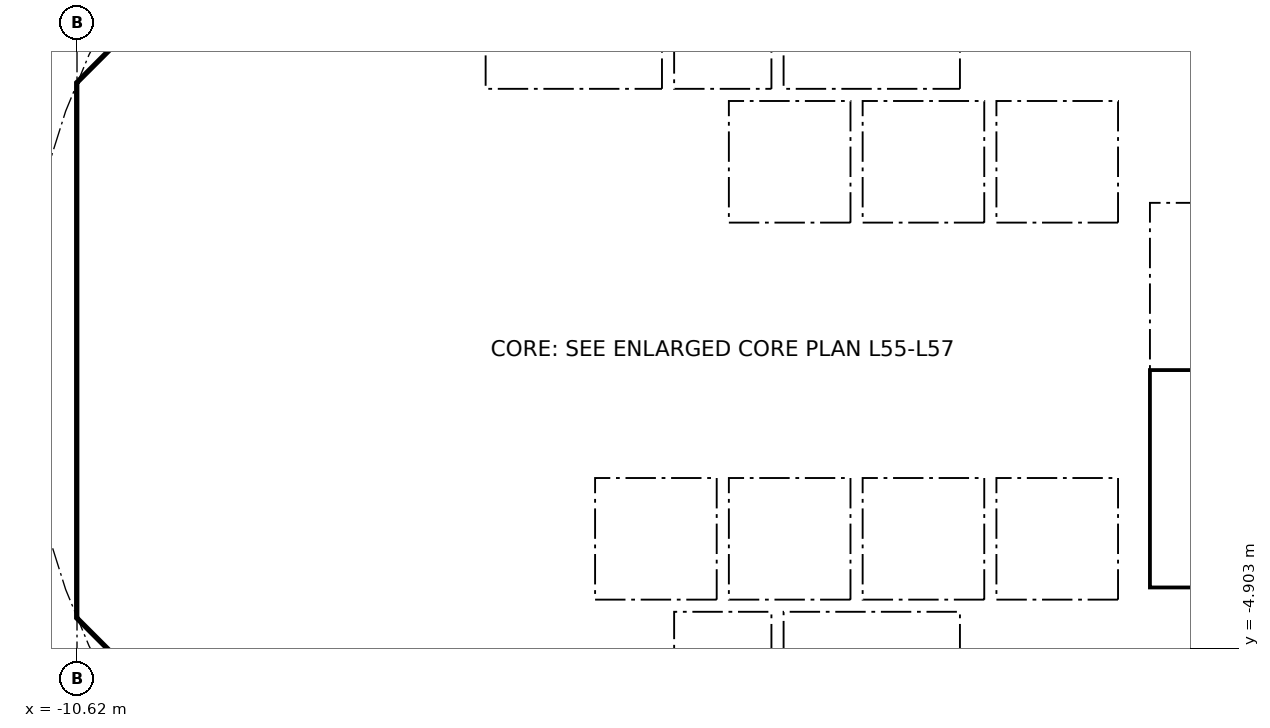
"""IFC4 building model, lengths in metres.
Left out: names, types, materials, properties, quantities, classifications, styles, units other than length and angle.
Written with IfcOpenShell. Run it as: python <this file> out.ifc"""

import sys

from ifc_helpers import new_model, si_unit, direction, frame, frame_2d, origin, place, context, subcontext, project, spatial, polyline, rectangle, outline, extrude, element, fill, save


model = new_model("IFC4")
c1 = context("Model", 3, precision=1e-05, world=origin(), true_north=direction((0.0, 1.0)))
c2 = subcontext(c1, "Body", "Model", "MODEL_VIEW")
j1 = project(units=[si_unit("LENGTHUNIT", "METRE"), si_unit("PLANEANGLEUNIT", "RADIAN")], contexts=[c1])
p1 = place(None, origin())
s1 = spatial("IfcSite", under=j1, at=p1, CompositionType="ELEMENT")
p2 = place(p1, origin())
s2 = spatial("IfcBuilding", under=s1, at=p2, CompositionType="ELEMENT")
p3 = place(p2, frame((0.0, 0.0, 227.0)))
s3 = spatial("IfcBuildingStorey", under=s2, at=p3, CompositionType="ELEMENT", Elevation=227.0)
p4 = place(p3, frame((9.988, 4.613, 0.0), z_axis=(0.0, 0.0, 1.0), x_axis=(-0.707106781187, 0.707106781187, 0.0)))
e1 = element("IfcWall", 1, at=p4, inside=s3, PredefinedType="SHEAR", context=c2, shape_type="SweptSolid", body=[
    extrude(rectangle(XDim=7.602, YDim=0.6, at=frame_2d((3.801, 0.0))), origin(), (0.0, 0.0, 1.0), 3.44),
])
p5 = place(p4, frame((3.201, 0.0, 0.0)))
e2 = element("IfcOpeningElement", 2, at=p5, cuts=e1, PredefinedType="OPENING", context=c2, shape_type="SweptSolid", body=[
    extrude(rectangle(XDim=1.2, YDim=2.1, at=frame_2d((0.6, 1.05))), frame((0.0, 0.31, 0.0), z_axis=(0.0, -1.0, 0.0), x_axis=(1.0, 0.0, 0.0)), (0.0, 0.0, 1.0), 0.62),
])
p6 = place(p3, frame((-4.613, 9.988, 0.0), z_axis=(0.0, 0.0, 1.0), x_axis=(-0.707106781187, -0.707106781187, 0.0)))
e3 = element("IfcWall", 3, at=p6, inside=s3, PredefinedType="SHEAR", context=c2, shape_type="SweptSolid", body=[
    extrude(rectangle(XDim=7.602, YDim=0.6, at=frame_2d((3.801, 0.0))), origin(), (0.0, 0.0, 1.0), 3.44),
])
p7 = place(p6, frame((0.351, 0.0, 0.0)))
e4 = element("IfcOpeningElement", 4, at=p7, cuts=e3, PredefinedType="OPENING", context=c2, shape_type="SweptSolid", body=[
    extrude(rectangle(XDim=1.1, YDim=2.1, at=frame_2d((0.55, 1.05))), frame((0.0, 0.31, 0.0), z_axis=(0.0, -1.0, 0.0), x_axis=(1.0, 0.0, 0.0)), (0.0, 0.0, 1.0), 0.62),
])
p8 = place(p3, frame((-10.325, 3.801, 0.0), z_axis=(0.0, 0.0, 1.0), x_axis=(0.0, -1.0, 0.0)))
e5 = element("IfcWall", 5, at=p8, inside=s3, PredefinedType="SHEAR", context=c2, shape_type="SweptSolid", body=[
    extrude(rectangle(XDim=7.602, YDim=0.6, at=frame_2d((3.801, 0.0))), origin(), (0.0, 0.0, 1.0), 3.44),
])
p9 = place(p8, frame((0.651, 0.0, 0.0)))
e6 = element("IfcOpeningElement", 6, at=p9, cuts=e5, PredefinedType="OPENING", context=c2, shape_type="SweptSolid", body=[
    extrude(rectangle(XDim=1.5, YDim=2.1, at=frame_2d((0.75, 1.05))), frame((0.0, 0.31, 0.0), z_axis=(0.0, -1.0, 0.0), x_axis=(1.0, 0.0, 0.0)), (0.0, 0.0, 1.0), 0.62),
])
p10 = place(p8, frame((5.451, 0.0, 0.0)))
e7 = element("IfcOpeningElement", 7, at=p10, cuts=e5, PredefinedType="OPENING", context=c2, shape_type="SweptSolid", body=[
    extrude(rectangle(XDim=1.5, YDim=2.1, at=frame_2d((0.75, 1.05))), frame((0.0, 0.31, 0.0), z_axis=(0.0, -1.0, 0.0), x_axis=(1.0, 0.0, 0.0)), (0.0, 0.0, 1.0), 0.62),
])
p11 = place(p3, frame((-9.988, -4.613, 0.0), z_axis=(0.0, 0.0, 1.0), x_axis=(0.707106781187, -0.707106781187, 0.0)))
e8 = element("IfcWall", 8, at=p11, inside=s3, PredefinedType="SHEAR", context=c2, shape_type="SweptSolid", body=[
    extrude(rectangle(XDim=7.602, YDim=0.6, at=frame_2d((3.801, 0.0))), origin(), (0.0, 0.0, 1.0), 3.44),
])
p12 = place(p11, frame((6.151, 0.0, 0.0)))
e9 = element("IfcOpeningElement", 9, at=p12, cuts=e8, PredefinedType="OPENING", context=c2, shape_type="SweptSolid", body=[
    extrude(rectangle(XDim=1.1, YDim=2.1, at=frame_2d((0.55, 1.05))), frame((0.0, 0.31, 0.0), z_axis=(0.0, -1.0, 0.0), x_axis=(1.0, 0.0, 0.0)), (0.0, 0.0, 1.0), 0.62),
])
p13 = place(p3, frame((4.613, -9.988, 0.0), z_axis=(0.0, 0.0, 1.0), x_axis=(0.707106781187, 0.707106781187, 0.0)))
e10 = element("IfcWall", 10, at=p13, inside=s3, PredefinedType="SHEAR", context=c2, shape_type="SweptSolid", body=[
    extrude(rectangle(XDim=7.602, YDim=0.6, at=frame_2d((3.801, 0.0))), origin(), (0.0, 0.0, 1.0), 3.44),
])
p14 = place(p13, frame((3.201, 0.0, 0.0)))
e11 = element("IfcOpeningElement", 11, at=p14, cuts=e10, PredefinedType="OPENING", context=c2, shape_type="SweptSolid", body=[
    extrude(rectangle(XDim=1.2, YDim=2.1, at=frame_2d((0.6, 1.05))), frame((0.0, 0.31, 0.0), z_axis=(0.0, -1.0, 0.0), x_axis=(1.0, 0.0, 0.0)), (0.0, 0.0, 1.0), 0.62),
])
p15 = place(p3, frame((-6.2, 4.3, 0.0), z_axis=(0.0, 0.0, 1.0), x_axis=(0.0, 1.0, 0.0)))
e12 = element("IfcWall", 12, at=p15, inside=s3, PredefinedType="PARTITIONING", context=c2, shape_type="SweptSolid", body=[
    extrude(rectangle(XDim=3.527, YDim=0.15, at=frame_2d((1.763, 0.0))), origin(), (0.0, 0.0, 1.0), 3.44),
])
p16 = place(p15, frame((0.262, 0.0, 0.0)))
e13 = element("IfcOpeningElement", 13, at=p16, cuts=e12, PredefinedType="OPENING", context=c2, shape_type="SweptSolid", body=[
    extrude(rectangle(XDim=0.9, YDim=2.1, at=frame_2d((0.45, 1.05))), frame((0.0, 0.085, 0.0), z_axis=(0.0, -1.0, 0.0), x_axis=(1.0, 0.0, 0.0)), (0.0, 0.0, 1.0), 0.17),
])
p17 = place(p15, frame((2.138, 0.0, 0.0)))
e14 = element("IfcOpeningElement", 14, at=p17, cuts=e12, PredefinedType="OPENING", context=c2, shape_type="SweptSolid", body=[
    extrude(rectangle(XDim=0.9, YDim=2.1, at=frame_2d((0.45, 1.05))), frame((0.0, 0.085, 0.0), z_axis=(0.0, -1.0, 0.0), x_axis=(1.0, 0.0, 0.0)), (0.0, 0.0, 1.0), 0.17),
])
p18 = place(p3, frame((4.0, 4.3, 0.0), z_axis=(0.0, 0.0, 1.0), x_axis=(0.0, 1.0, 0.0)))
e15 = element("IfcWall", 15, at=p18, inside=s3, PredefinedType="SOLIDWALL", context=c2, shape_type="SweptSolid", body=[
    extrude(rectangle(XDim=2.2, YDim=0.2, at=frame_2d((1.1, 0.0))), origin(), (0.0, 0.0, 1.0), 3.44),
])
p19 = place(p18, frame((0.55, 0.0, 0.0)))
e16 = element("IfcOpeningElement", 16, at=p19, cuts=e15, PredefinedType="OPENING", context=c2, shape_type="SweptSolid", body=[
    extrude(rectangle(XDim=1.1, YDim=2.1, at=frame_2d((0.55, 1.05))), frame((0.0, 0.11, 0.0), z_axis=(0.0, -1.0, 0.0), x_axis=(1.0, 0.0, 0.0)), (0.0, 0.0, 1.0), 0.22),
])
p20 = place(p3, frame((-4.0, 4.3, 0.0), z_axis=(0.0, 0.0, 1.0), x_axis=(0.0, 1.0, 0.0)))
e17 = element("IfcWall", 17, at=p20, inside=s3, PredefinedType="SOLIDWALL", context=c2, shape_type="SweptSolid", body=[
    extrude(rectangle(XDim=2.2, YDim=0.2, at=frame_2d((1.1, 0.0))), origin(), (0.0, 0.0, 1.0), 3.44),
])
p21 = place(p20, frame((0.55, 0.0, 0.0)))
e18 = element("IfcOpeningElement", 18, at=p21, cuts=e17, PredefinedType="OPENING", context=c2, shape_type="SweptSolid", body=[
    extrude(rectangle(XDim=1.1, YDim=2.1, at=frame_2d((0.55, 1.05))), frame((0.0, 0.11, 0.0), z_axis=(0.0, -1.0, 0.0), x_axis=(1.0, 0.0, 0.0)), (0.0, 0.0, 1.0), 0.22),
])
p22 = place(p3, frame((-6.7, 2.0, 0.0), z_axis=(0.0, 0.0, 1.0), x_axis=(1.0, 0.0, 0.0)))
e19 = element("IfcWall", 19, at=p22, inside=s3, PredefinedType="SOLIDWALL", context=c2, shape_type="SweptSolid", body=[
    extrude(rectangle(XDim=13.4, YDim=0.2, at=frame_2d((6.7, 0.0))), origin(), (0.0, 0.0, 1.0), 3.44),
])
p23 = place(p22, frame((7.25, 0.0, 0.0)))
e20 = element("IfcOpeningElement", 20, at=p23, cuts=e19, PredefinedType="OPENING", context=c2, shape_type="SweptSolid", body=[
    extrude(rectangle(XDim=1.1, YDim=2.1, at=frame_2d((0.55, 1.05))), frame((0.0, 0.11, 0.0), z_axis=(0.0, -1.0, 0.0), x_axis=(1.0, 0.0, 0.0)), (0.0, 0.0, 1.0), 0.22),
])
p24 = place(p22, frame((9.45, 0.0, 0.0)))
e21 = element("IfcOpeningElement", 21, at=p24, cuts=e19, PredefinedType="OPENING", context=c2, shape_type="SweptSolid", body=[
    extrude(rectangle(XDim=1.1, YDim=2.1, at=frame_2d((0.55, 1.05))), frame((0.0, 0.11, 0.0), z_axis=(0.0, -1.0, 0.0), x_axis=(1.0, 0.0, 0.0)), (0.0, 0.0, 1.0), 0.22),
])
p25 = place(p22, frame((1.85, 0.0, 0.0)))
e22 = element("IfcOpeningElement", 22, at=p25, cuts=e19, PredefinedType="OPENING", context=c2, shape_type="SweptSolid", body=[
    extrude(rectangle(XDim=0.9, YDim=2.1, at=frame_2d((0.45, 1.05))), frame((0.0, 0.11, 0.0), z_axis=(0.0, -1.0, 0.0), x_axis=(1.0, 0.0, 0.0)), (0.0, 0.0, 1.0), 0.22),
])
p26 = place(p22, frame((5.15, 0.0, 0.0)))
e23 = element("IfcOpeningElement", 23, at=p26, cuts=e19, PredefinedType="OPENING", context=c2, shape_type="SweptSolid", body=[
    extrude(rectangle(XDim=0.9, YDim=2.1, at=frame_2d((0.45, 1.05))), frame((0.0, 0.11, 0.0), z_axis=(0.0, -1.0, 0.0), x_axis=(1.0, 0.0, 0.0)), (0.0, 0.0, 1.0), 0.22),
])
p27 = place(p3, frame((6.7, 4.0, 0.0), z_axis=(0.0, 0.0, 1.0), x_axis=(1.0, 0.0, 0.0)))
e24 = element("IfcWall", 24, at=p27, inside=s3, PredefinedType="SOLIDWALL", context=c2, shape_type="SweptSolid", body=[
    extrude(rectangle(XDim=3.325, YDim=0.2, at=frame_2d((1.662, 0.0))), origin(), (0.0, 0.0, 1.0), 3.44),
])
p28 = place(p27, frame((1.25, 0.0, 0.0)))
e25 = element("IfcOpeningElement", 25, at=p28, cuts=e24, PredefinedType="OPENING", context=c2, shape_type="SweptSolid", body=[
    extrude(rectangle(XDim=1.1, YDim=2.1, at=frame_2d((0.55, 1.05))), frame((0.0, 0.11, 0.0), z_axis=(0.0, -1.0, 0.0), x_axis=(1.0, 0.0, 0.0)), (0.0, 0.0, 1.0), 0.22),
])
p29 = place(p3, frame((-6.6, -7.427, 0.0), z_axis=(0.0, 0.0, 1.0), x_axis=(0.0, 1.0, 0.0)))
e26 = element("IfcWall", 26, at=p29, inside=s3, PredefinedType="PARTITIONING", context=c2, shape_type="SweptSolid", body=[
    extrude(rectangle(XDim=3.127, YDim=0.15, at=frame_2d((1.563, 0.0))), origin(), (0.0, 0.0, 1.0), 3.44),
])
p30 = place(p29, frame((1.076, 0.0, 0.0)))
e27 = element("IfcOpeningElement", 27, at=p30, cuts=e26, PredefinedType="OPENING", context=c2, shape_type="SweptSolid", body=[
    extrude(rectangle(XDim=0.9, YDim=2.1, at=frame_2d((0.45, 1.05))), frame((0.0, 0.085, 0.0), z_axis=(0.0, -1.0, 0.0), x_axis=(1.0, 0.0, 0.0)), (0.0, 0.0, 1.0), 0.17),
])
p31 = place(p3, frame((4.0, -6.5, 0.0), z_axis=(0.0, 0.0, 1.0), x_axis=(0.0, 1.0, 0.0)))
e28 = element("IfcWall", 28, at=p31, inside=s3, PredefinedType="SOLIDWALL", context=c2, shape_type="SweptSolid", body=[
    extrude(rectangle(XDim=2.2, YDim=0.2, at=frame_2d((1.1, 0.0))), origin(), (0.0, 0.0, 1.0), 3.44),
])
p32 = place(p31, frame((0.55, 0.0, 0.0)))
e29 = element("IfcOpeningElement", 29, at=p32, cuts=e28, PredefinedType="OPENING", context=c2, shape_type="SweptSolid", body=[
    extrude(rectangle(XDim=1.1, YDim=2.1, at=frame_2d((0.55, 1.05))), frame((0.0, 0.11, 0.0), z_axis=(0.0, -1.0, 0.0), x_axis=(1.0, 0.0, 0.0)), (0.0, 0.0, 1.0), 0.22),
])
p33 = place(p3, frame((-4.0, -6.5, 0.0), z_axis=(0.0, 0.0, 1.0), x_axis=(0.0, 1.0, 0.0)))
e30 = element("IfcWall", 30, at=p33, inside=s3, PredefinedType="SOLIDWALL", context=c2, shape_type="SweptSolid", body=[
    extrude(rectangle(XDim=2.2, YDim=0.2, at=frame_2d((1.1, 0.0))), origin(), (0.0, 0.0, 1.0), 3.44),
])
p34 = place(p33, frame((0.65, 0.0, 0.0)))
e31 = element("IfcOpeningElement", 31, at=p34, cuts=e30, PredefinedType="OPENING", context=c2, shape_type="SweptSolid", body=[
    extrude(rectangle(XDim=0.9, YDim=2.1, at=frame_2d((0.45, 1.05))), frame((0.0, 0.11, 0.0), z_axis=(0.0, -1.0, 0.0), x_axis=(1.0, 0.0, 0.0)), (0.0, 0.0, 1.0), 0.22),
])
p35 = place(p3, frame((-6.7, -2.0, 0.0), z_axis=(0.0, 0.0, 1.0), x_axis=(1.0, 0.0, 0.0)))
e32 = element("IfcWall", 32, at=p35, inside=s3, PredefinedType="SOLIDWALL", context=c2, shape_type="SweptSolid", body=[
    extrude(rectangle(XDim=13.4, YDim=0.2, at=frame_2d((6.7, 0.0))), origin(), (0.0, 0.0, 1.0), 3.44),
])
p36 = place(p35, frame((5.05, 0.0, 0.0)))
e33 = element("IfcOpeningElement", 33, at=p36, cuts=e32, PredefinedType="OPENING", context=c2, shape_type="SweptSolid", body=[
    extrude(rectangle(XDim=1.1, YDim=2.1, at=frame_2d((0.55, 1.05))), frame((0.0, 0.11, 0.0), z_axis=(0.0, -1.0, 0.0), x_axis=(1.0, 0.0, 0.0)), (0.0, 0.0, 1.0), 0.22),
])
p37 = place(p35, frame((7.25, 0.0, 0.0)))
e34 = element("IfcOpeningElement", 34, at=p37, cuts=e32, PredefinedType="OPENING", context=c2, shape_type="SweptSolid", body=[
    extrude(rectangle(XDim=1.1, YDim=2.1, at=frame_2d((0.55, 1.05))), frame((0.0, 0.11, 0.0), z_axis=(0.0, -1.0, 0.0), x_axis=(1.0, 0.0, 0.0)), (0.0, 0.0, 1.0), 0.22),
])
p38 = place(p35, frame((1.85, 0.0, 0.0)))
e35 = element("IfcOpeningElement", 35, at=p38, cuts=e32, PredefinedType="OPENING", context=c2, shape_type="SweptSolid", body=[
    extrude(rectangle(XDim=0.9, YDim=2.1, at=frame_2d((0.45, 1.05))), frame((0.0, 0.11, 0.0), z_axis=(0.0, -1.0, 0.0), x_axis=(1.0, 0.0, 0.0)), (0.0, 0.0, 1.0), 0.22),
])
p39 = place(p3, origin())
e36 = element("IfcWall", 36, at=p39, inside=s3, PredefinedType="SHEAR", context=c2, shape_type="SweptSolid", body=[
    extrude(outline(polyline([(-10.625, -3.801), (-10.025, -3.801), (-10.025, -4.152), (-9.776, -4.401), (-10.2, -4.825), (-10.625, -4.401), (-10.625, -3.801)])), origin(), (0.0, 0.0, 1.0), 3.44),
])
p40 = place(p3, origin())
e37 = element("IfcWall", 37, at=p40, inside=s3, PredefinedType="SHEAR", context=c2, shape_type="SweptSolid", body=[
    extrude(outline(polyline([(-10.2, 4.825), (-9.776, 4.401), (-10.025, 4.152), (-10.025, 3.801), (-10.625, 3.801), (-10.625, 4.401), (-10.2, 4.825)])), origin(), (0.0, 0.0, 1.0), 3.44),
])
for number, where, z_axis, x_axis in (
    (38, (-10.025, -4.0, 0.0), (0.0, 0.0, 1.0), (1.0, 0.0, 0.0)),
    (39, (-10.025, 4.0, 0.0), (0.0, 0.0, 1.0), (1.0, 0.0, 0.0)),
):
    element("IfcWall", number, at=place(p3, frame(where, z_axis=z_axis, x_axis=x_axis)), inside=s3, PredefinedType="PARTITIONING", context=c2, shape_type="SweptSolid", body=[
        extrude(rectangle(XDim=3.325, YDim=0.2, at=frame_2d((1.662, 0.0))), origin(), (0.0, 0.0, 1.0), 3.44),
    ])
for number, where, z_axis, x_axis in (
    (40, (-0.9, -6.5, 0.0), (0.0, 0.0, 1.0), (0.0, 1.0, 0.0)),
    (41, (0.9, -6.5, 0.0), (0.0, 0.0, 1.0), (0.0, 1.0, 0.0)),
):
    element("IfcWall", number, at=place(p3, frame(where, z_axis=z_axis, x_axis=x_axis)), inside=s3, PredefinedType="SOLIDWALL", context=c2, shape_type="SweptSolid", body=[
        extrude(rectangle(XDim=2.2, YDim=0.2, at=frame_2d((1.1, 0.0))), origin(), (0.0, 0.0, 1.0), 3.44),
    ])
p41 = place(p3, origin())
e42 = element("IfcWall", 42, at=p41, inside=s3, PredefinedType="SOLIDWALL", context=c2, shape_type="SweptSolid", body=[
    extrude(outline(polyline([(-6.7, -2.1), (-6.5, -2.1), (-6.5, -4.1), (-2.3, -4.1), (-2.3, -2.1), (-2.1, -2.1), (-2.1, -4.1), (-0.1, -4.1), (-0.1, -2.1), (0.1, -2.1), (0.1, -4.1), (2.1, -4.1), (2.1, -2.1), (2.3, -2.1), (2.3, -4.1), (4.3, -4.1), (4.3, -2.1), (4.5, -2.1), (4.5, -4.1), (6.5, -4.1), (6.5, -2.1), (6.7, -2.1), (6.7, -4.3), (-6.7, -4.3), (-6.7, -2.1)])), origin(), (0.0, 0.0, 1.0), 3.44),
])
for number, where, z_axis, x_axis in (
    (43, (-0.9, 4.3, 0.0), (0.0, 0.0, 1.0), (0.0, 1.0, 0.0)),
    (44, (0.9, 4.3, 0.0), (0.0, 0.0, 1.0), (0.0, 1.0, 0.0)),
):
    element("IfcWall", number, at=place(p3, frame(where, z_axis=z_axis, x_axis=x_axis)), inside=s3, PredefinedType="SOLIDWALL", context=c2, shape_type="SweptSolid", body=[
        extrude(rectangle(XDim=2.2, YDim=0.2, at=frame_2d((1.1, 0.0))), origin(), (0.0, 0.0, 1.0), 3.44),
    ])
p42 = place(p3, origin())
e45 = element("IfcWall", 45, at=p42, inside=s3, PredefinedType="SOLIDWALL", context=c2, shape_type="SweptSolid", body=[
    extrude(outline(polyline([(-6.7, 4.3), (6.7, 4.3), (6.7, 2.1), (6.5, 2.1), (6.5, 4.1), (4.5, 4.1), (4.5, 2.1), (4.3, 2.1), (4.3, 4.1), (2.3, 4.1), (2.3, 2.1), (2.1, 2.1), (2.1, 4.1), (0.1, 4.1), (0.1, 2.1), (-0.1, 2.1), (-0.1, 4.1), (-2.1, 4.1), (-2.1, 2.1), (-2.3, 2.1), (-2.3, 4.1), (-6.5, 4.1), (-6.5, 2.1), (-6.7, 2.1), (-6.7, 4.3)])), origin(), (0.0, 0.0, 1.0), 3.44),
])
p43 = place(p3, origin())
e46 = element("IfcWall", 46, at=p43, inside=s3, PredefinedType="SOLIDWALL", context=c2, shape_type="SweptSolid", body=[
    extrude(outline(polyline([(7.025, -3.9), (6.7, -3.9), (6.7, 3.9), (7.025, 3.9), (7.025, -3.9)])), origin(), (0.0, 0.0, 1.0), 3.44),
])
p44 = place(p3, origin())
e47 = element("IfcWall", 47, at=p44, inside=s3, PredefinedType="SOLIDWALL", context=c2, shape_type="SweptSolid", body=[
    extrude(outline(polyline([(10.025, -4.1), (6.7, -4.1), (6.7, -3.9), (10.025, -3.9), (10.025, -4.1)])), origin(), (0.0, 0.0, 1.0), 3.44),
])
p45 = place(p23, origin())
e48 = element("IfcDoor", 48, at=p45, inside=s3, OperationType="DOUBLE_DOOR_SLIDING", PredefinedType="DOOR", context=c2, shape_type="SweptSolid", body=[
    extrude(rectangle(XDim=1.1, YDim=2.1, at=frame_2d((0.55, 1.05))), frame((0.0, 0.025, 0.0), z_axis=(0.0, -1.0, 0.0), x_axis=(1.0, 0.0, 0.0)), (0.0, 0.0, 1.0), 0.05),
])
fill(e20, e48)
p46 = place(p24, origin())
e49 = element("IfcDoor", 49, at=p46, inside=s3, OperationType="DOUBLE_DOOR_SLIDING", PredefinedType="DOOR", context=c2, shape_type="SweptSolid", body=[
    extrude(rectangle(XDim=1.1, YDim=2.1, at=frame_2d((0.55, 1.05))), frame((0.0, 0.025, 0.0), z_axis=(0.0, -1.0, 0.0), x_axis=(1.0, 0.0, 0.0)), (0.0, 0.0, 1.0), 0.05),
])
fill(e21, e49)
p47 = place(p36, origin())
e50 = element("IfcDoor", 50, at=p47, inside=s3, OperationType="DOUBLE_DOOR_SLIDING", PredefinedType="DOOR", context=c2, shape_type="SweptSolid", body=[
    extrude(rectangle(XDim=1.1, YDim=2.1, at=frame_2d((0.55, 1.05))), frame((0.0, 0.025, 0.0), z_axis=(0.0, -1.0, 0.0), x_axis=(1.0, 0.0, 0.0)), (0.0, 0.0, 1.0), 0.05),
])
fill(e33, e50)
p48 = place(p37, origin())
e51 = element("IfcDoor", 51, at=p48, inside=s3, OperationType="DOUBLE_DOOR_SLIDING", PredefinedType="DOOR", context=c2, shape_type="SweptSolid", body=[
    extrude(rectangle(XDim=1.1, YDim=2.1, at=frame_2d((0.55, 1.05))), frame((0.0, 0.025, 0.0), z_axis=(0.0, -1.0, 0.0), x_axis=(1.0, 0.0, 0.0)), (0.0, 0.0, 1.0), 0.05),
])
fill(e34, e51)
p49 = place(p19, origin())
e52 = element("IfcDoor", 52, at=p49, inside=s3, OperationType="DOUBLE_DOOR_SLIDING", PredefinedType="DOOR", context=c2, shape_type="SweptSolid", body=[
    extrude(rectangle(XDim=1.1, YDim=2.1, at=frame_2d((0.55, 1.05))), frame((0.0, 0.025, 0.0), z_axis=(0.0, -1.0, 0.0), x_axis=(1.0, 0.0, 0.0)), (0.0, 0.0, 1.0), 0.05),
])
fill(e16, e52)
p50 = place(p32, origin())
e53 = element("IfcDoor", 53, at=p50, inside=s3, OperationType="DOUBLE_DOOR_SLIDING", PredefinedType="DOOR", context=c2, shape_type="SweptSolid", body=[
    extrude(rectangle(XDim=1.1, YDim=2.1, at=frame_2d((0.55, 1.05))), frame((0.0, 0.025, 0.0), z_axis=(0.0, -1.0, 0.0), x_axis=(1.0, 0.0, 0.0)), (0.0, 0.0, 1.0), 0.05),
])
fill(e29, e53)
p51 = place(p21, origin())
e54 = element("IfcDoor", 54, at=p51, inside=s3, OperationType="DOUBLE_DOOR_SLIDING", PredefinedType="DOOR", context=c2, shape_type="SweptSolid", body=[
    extrude(rectangle(XDim=1.1, YDim=2.1, at=frame_2d((0.55, 1.05))), frame((0.0, 0.025, 0.0), z_axis=(0.0, -1.0, 0.0), x_axis=(1.0, 0.0, 0.0)), (0.0, 0.0, 1.0), 0.05),
])
fill(e18, e54)
p52 = place(p16, origin())
e55 = element("IfcDoor", 55, at=p52, inside=s3, OperationType="SINGLE_SWING_LEFT", PredefinedType="DOOR", context=c2, shape_type="SweptSolid", body=[
    extrude(rectangle(XDim=0.9, YDim=2.1, at=frame_2d((0.45, 1.05))), frame((0.0, 0.025, 0.0), z_axis=(0.0, -1.0, 0.0), x_axis=(1.0, 0.0, 0.0)), (0.0, 0.0, 1.0), 0.05),
])
fill(e13, e55)
p53 = place(p25, origin())
e56 = element("IfcDoor", 56, at=p53, inside=s3, OperationType="SINGLE_SWING_RIGHT", PredefinedType="DOOR", context=c2, shape_type="SweptSolid", body=[
    extrude(rectangle(XDim=0.9, YDim=2.1, at=frame_2d((0.45, 1.05))), frame((0.0, 0.025, 0.0), z_axis=(0.0, -1.0, 0.0), x_axis=(1.0, 0.0, 0.0)), (0.0, 0.0, 1.0), 0.05),
])
fill(e22, e56)
p54 = place(p26, origin())
e57 = element("IfcDoor", 57, at=p54, inside=s3, OperationType="SINGLE_SWING_RIGHT", PredefinedType="DOOR", context=c2, shape_type="SweptSolid", body=[
    extrude(rectangle(XDim=0.9, YDim=2.1, at=frame_2d((0.45, 1.05))), frame((0.0, 0.025, 0.0), z_axis=(0.0, -1.0, 0.0), x_axis=(1.0, 0.0, 0.0)), (0.0, 0.0, 1.0), 0.05),
])
fill(e23, e57)
p55 = place(p38, frame((0.9, 0.0, 0.0), x_axis=(-1.0, 0.0, 0.0)))
e58 = element("IfcDoor", 58, at=p55, inside=s3, OperationType="SINGLE_SWING_LEFT", PredefinedType="DOOR", context=c2, shape_type="SweptSolid", body=[
    extrude(rectangle(XDim=0.9, YDim=2.1, at=frame_2d((0.45, 1.05))), frame((0.0, 0.025, 0.0), z_axis=(0.0, -1.0, 0.0), x_axis=(1.0, 0.0, 0.0)), (0.0, 0.0, 1.0), 0.05),
])
fill(e35, e58)
p56 = place(p9, origin())
e59 = element("IfcDoor", 59, at=p56, inside=s3, OperationType="DOUBLE_DOOR_SINGLE_SWING", PredefinedType="DOOR", context=c2, shape_type="SweptSolid", body=[
    extrude(rectangle(XDim=1.5, YDim=2.1, at=frame_2d((0.75, 1.05))), frame((0.0, 0.025, 0.0), z_axis=(0.0, -1.0, 0.0), x_axis=(1.0, 0.0, 0.0)), (0.0, 0.0, 1.0), 0.05),
])
fill(e6, e59)
p57 = place(p10, origin())
e60 = element("IfcDoor", 60, at=p57, inside=s3, OperationType="DOUBLE_DOOR_SINGLE_SWING", PredefinedType="DOOR", context=c2, shape_type="SweptSolid", body=[
    extrude(rectangle(XDim=1.5, YDim=2.1, at=frame_2d((0.75, 1.05))), frame((0.0, 0.025, 0.0), z_axis=(0.0, -1.0, 0.0), x_axis=(1.0, 0.0, 0.0)), (0.0, 0.0, 1.0), 0.05),
])
fill(e7, e60)
save(model, sys.argv[1])
